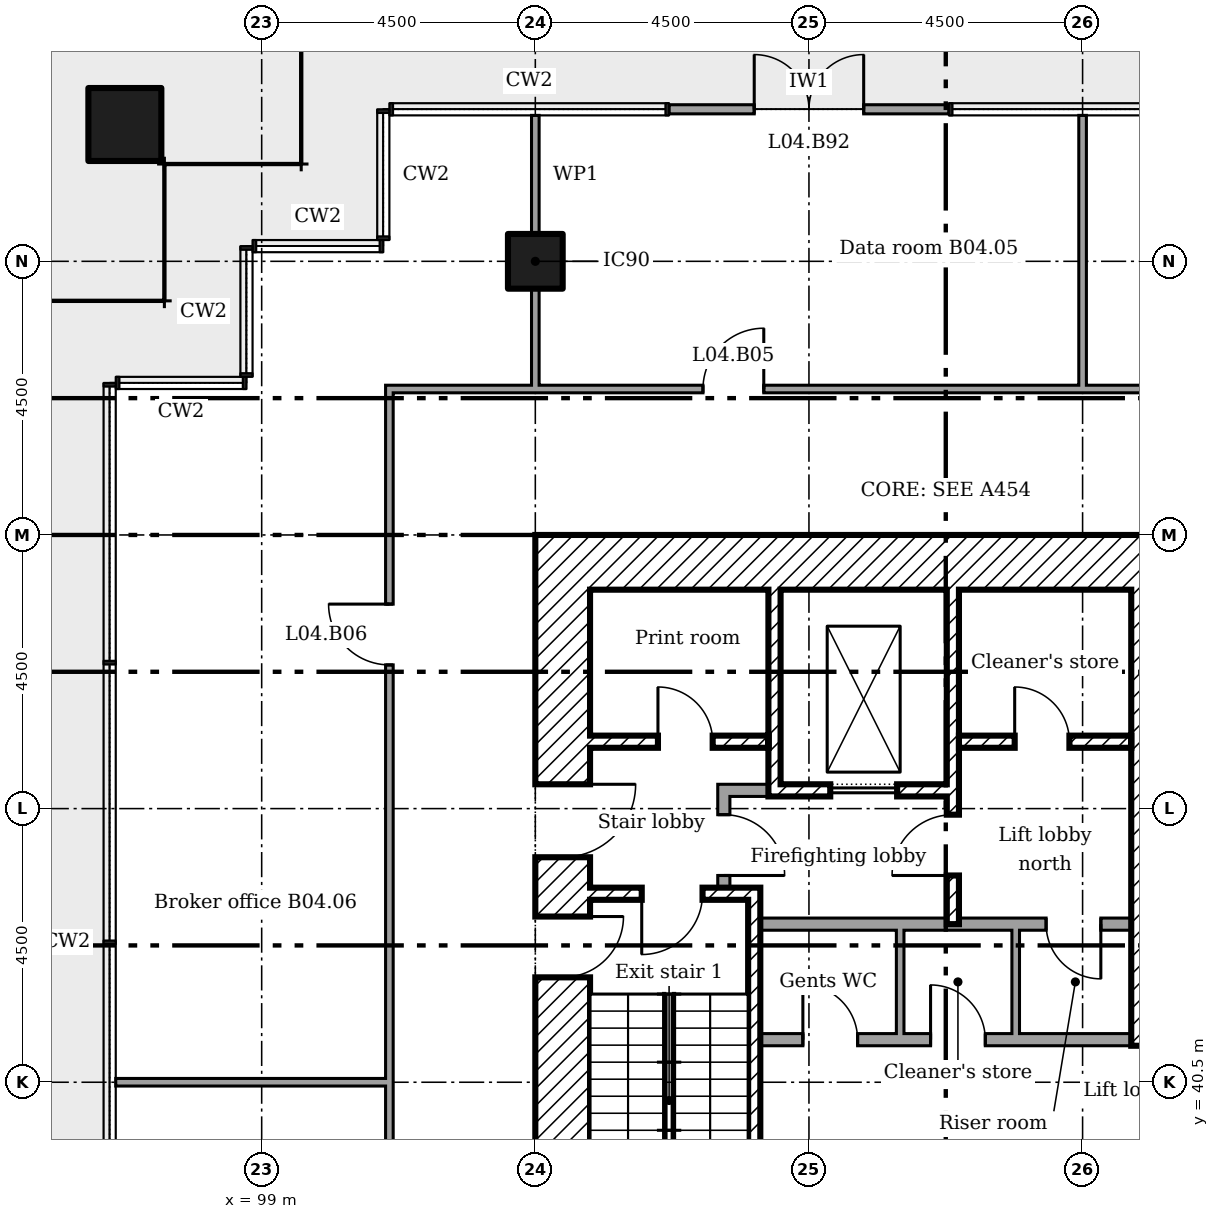
"""IFC4 building model, lengths in metres.
Left out: names, types, materials, properties, quantities, classifications, styles, units other than length and angle.
Written with IfcOpenShell. Run it as: python <this file> out.ifc"""

import sys

from ifc_helpers import new_model, si_unit, direction, frame, frame_2d, origin, origin_2d, place, context, subcontext, project, spatial, rectangle, extrude, element, fill, save


model = new_model("IFC4")
c1 = context("Model", 3, precision=1e-05, world=origin(), true_north=direction((0.0, 1.0)))
c2 = subcontext(c1, "Body", "Model", "MODEL_VIEW")
j1 = project(units=[si_unit("LENGTHUNIT", "METRE"), si_unit("PLANEANGLEUNIT", "RADIAN")], contexts=[c1])
p1 = place(None, origin())
s1 = spatial("IfcSite", under=j1, at=p1, CompositionType="ELEMENT")
p2 = place(p1, origin())
s2 = spatial("IfcBuilding", under=s1, at=p2, CompositionType="ELEMENT")
p3 = place(p2, frame((0.0, 0.0, 21.0)))
s3 = spatial("IfcBuildingStorey", under=s2, at=p3, CompositionType="ELEMENT", Elevation=21.0)
p4 = place(p3, frame((96.75, 56.25, 0.0)))
e1 = element("IfcColumn", 1, at=p4, inside=s3, PredefinedType="COLUMN", context=c2, shape_type="SweptSolid", body=[
    extrude(rectangle(XDim=1.2, YDim=1.2, at=origin_2d()), origin(), (0.0, 0.0, 1.0), 4.4),
])
p5 = place(p3, frame((103.5, 54.0, 0.0)))
e2 = element("IfcColumn", 2, at=p5, inside=s3, PredefinedType="COLUMN", context=c2, shape_type="SweptSolid", body=[
    extrude(rectangle(XDim=0.9, YDim=0.9, at=origin_2d()), origin(), (0.0, 0.0, 1.0), 4.4),
])
p6 = place(p3, frame((110.3, 56.5, 0.0), z_axis=(0.0, 0.0, 1.0), x_axis=(-1.0, 0.0, 0.0)))
e3 = element("IfcWall", 3, at=p6, inside=s3, PredefinedType="SOLIDWALL", context=c2, shape_type="SweptSolid", body=[
    extrude(rectangle(XDim=4.6, YDim=0.15, at=frame_2d((2.3, 0.0))), origin(), (0.0, 0.0, 1.0), 4.225),
])
p7 = place(p6, frame((1.4, 0.0, 0.0)))
e4 = element("IfcOpeningElement", 4, at=p7, cuts=e3, PredefinedType="OPENING", context=c2, shape_type="SweptSolid", body=[
    extrude(rectangle(XDim=1.8, YDim=2.4, at=frame_2d((0.9, 1.2))), frame((0.0, 0.085, 0.0), z_axis=(0.0, -1.0, 0.0), x_axis=(1.0, 0.0, 0.0)), (0.0, 0.0, 1.0), 0.17),
])
p8 = place(p3, frame((104.4, 49.05, 0.0)))
e5 = element("IfcWall", 5, at=p8, inside=s3, PredefinedType="SHEAR", context=c2, shape_type="SweptSolid", body=[
    extrude(rectangle(XDim=11.7, YDim=0.9, at=frame_2d((5.85, 0.0))), origin(), (0.0, 0.0, 1.0), 4.125),
])
p9 = place(p3, frame((103.95, 36.0, 0.0), z_axis=(0.0, 0.0, 1.0), x_axis=(0.0, 1.0, 0.0)))
e6 = element("IfcWall", 6, at=p9, inside=s3, PredefinedType="SHEAR", context=c2, shape_type="SweptSolid", body=[
    extrude(rectangle(XDim=13.5, YDim=0.9, at=frame_2d((6.75, 0.0))), origin(), (0.0, 0.0, 1.0), 4.125),
])
p10 = place(p9, frame((8.2, 0.0, 0.0)))
e7 = element("IfcOpeningElement", 7, at=p10, cuts=e6, PredefinedType="OPENING", context=c2, shape_type="SweptSolid", body=[
    extrude(rectangle(XDim=1.2, YDim=2.1, at=frame_2d((0.6, 1.05))), frame((0.0, 0.46, 0.0), z_axis=(0.0, -1.0, 0.0), x_axis=(1.0, 0.0, 0.0)), (0.0, 0.0, 1.0), 0.92),
])
p11 = place(p9, frame((6.225, 0.0, 0.0)))
e8 = element("IfcOpeningElement", 8, at=p11, cuts=e6, PredefinedType="OPENING", context=c2, shape_type="SweptSolid", body=[
    extrude(rectangle(XDim=1.0, YDim=2.1, at=frame_2d((0.5, 1.05))), frame((0.0, 0.46, 0.0), z_axis=(0.0, -1.0, 0.0), x_axis=(1.0, 0.0, 0.0)), (0.0, 0.0, 1.0), 0.92),
])
p12 = place(p3, frame((107.433, 48.6, 0.0), z_axis=(0.0, 0.0, 1.0), x_axis=(0.0, -1.0, 0.0)))
e9 = element("IfcWall", 9, at=p12, inside=s3, PredefinedType="SHEAR", context=c2, shape_type="SweptSolid", body=[
    extrude(rectangle(XDim=3.4, YDim=0.2, at=frame_2d((1.7, 0.0))), origin(), (0.0, 0.0, 1.0), 4.125),
])
p13 = place(p3, frame((110.367, 48.6, 0.0), z_axis=(0.0, 0.0, 1.0), x_axis=(0.0, -1.0, 0.0)))
e10 = element("IfcWall", 10, at=p13, inside=s3, PredefinedType="SHEAR", context=c2, shape_type="SweptSolid", body=[
    extrude(rectangle(XDim=5.5, YDim=0.2, at=frame_2d((2.75, 0.0))), origin(), (0.0, 0.0, 1.0), 4.125),
])
p14 = place(p13, frame((3.7, 0.0, 0.0)))
e11 = element("IfcOpeningElement", 11, at=p14, cuts=e10, PredefinedType="OPENING", context=c2, shape_type="SweptSolid", body=[
    extrude(rectangle(XDim=1.0, YDim=2.1, at=frame_2d((0.5, 1.05))), frame((0.0, 0.11, 0.0), z_axis=(0.0, -1.0, 0.0), x_axis=(1.0, 0.0, 0.0)), (0.0, 0.0, 1.0), 0.22),
])
p15 = place(p3, frame((106.5, 45.3, 0.0)))
e12 = element("IfcWall", 12, at=p15, inside=s3, PredefinedType="PARTITIONING", context=c2, shape_type="SweptSolid", body=[
    extrude(rectangle(XDim=0.833, YDim=0.2, at=frame_2d((0.417, 0.0))), origin(), (0.0, 0.0, 1.0), 4.125),
])
p16 = place(p3, frame((106.6, 43.7, 0.0), z_axis=(0.0, 0.0, 1.0), x_axis=(0.0, 1.0, 0.0)))
e13 = element("IfcWall", 13, at=p16, inside=s3, PredefinedType="PARTITIONING", context=c2, shape_type="SweptSolid", body=[
    extrude(rectangle(XDim=1.5, YDim=0.2, at=frame_2d((0.75, 0.0))), origin(), (0.0, 0.0, 1.0), 4.125),
])
p17 = place(p16, frame((0.2, 0.0, 0.0)))
e14 = element("IfcOpeningElement", 14, at=p17, cuts=e13, PredefinedType="OPENING", context=c2, shape_type="SweptSolid", body=[
    extrude(rectangle(XDim=1.0, YDim=2.1, at=frame_2d((0.5, 1.05))), frame((0.0, 0.11, 0.0), z_axis=(0.0, -1.0, 0.0), x_axis=(1.0, 0.0, 0.0)), (0.0, 0.0, 1.0), 0.22),
])
p18 = place(p3, frame((104.4, 46.1, 0.0)))
e15 = element("IfcWall", 15, at=p18, inside=s3, PredefinedType="SHEAR", context=c2, shape_type="SweptSolid", body=[
    extrude(rectangle(XDim=2.933, YDim=0.2, at=frame_2d((1.467, 0.0))), origin(), (0.0, 0.0, 1.0), 4.125),
])
p19 = place(p18, frame((1.117, 0.0, 0.0)))
e16 = element("IfcOpeningElement", 16, at=p19, cuts=e15, PredefinedType="OPENING", context=c2, shape_type="SweptSolid", body=[
    extrude(rectangle(XDim=0.9, YDim=2.1, at=frame_2d((0.45, 1.05))), frame((0.0, 0.11, 0.0), z_axis=(0.0, -1.0, 0.0), x_axis=(1.0, 0.0, 0.0)), (0.0, 0.0, 1.0), 0.22),
])
p20 = place(p3, frame((110.467, 46.1, 0.0)))
e17 = element("IfcWall", 17, at=p20, inside=s3, PredefinedType="SHEAR", context=c2, shape_type="SweptSolid", body=[
    extrude(rectangle(XDim=2.833, YDim=0.2, at=frame_2d((1.417, 0.0))), origin(), (0.0, 0.0, 1.0), 4.125),
])
p21 = place(p20, frame((0.917, 0.0, 0.0)))
e18 = element("IfcOpeningElement", 18, at=p21, cuts=e17, PredefinedType="OPENING", context=c2, shape_type="SweptSolid", body=[
    extrude(rectangle(XDim=0.9, YDim=2.1, at=frame_2d((0.45, 1.05))), frame((0.0, 0.11, 0.0), z_axis=(0.0, -1.0, 0.0), x_axis=(1.0, 0.0, 0.0)), (0.0, 0.0, 1.0), 0.22),
])
p22 = place(p3, frame((107.533, 45.3, 0.0)))
e19 = element("IfcWall", 19, at=p22, inside=s3, PredefinedType="SHEAR", context=c2, shape_type="SweptSolid", body=[
    extrude(rectangle(XDim=2.733, YDim=0.2, at=frame_2d((1.367, 0.0))), origin(), (0.0, 0.0, 1.0), 4.125),
])
p23 = place(p22, frame((0.817, 0.0, 0.0)))
e20 = element("IfcOpeningElement", 20, at=p23, cuts=e19, PredefinedType="OPENING", context=c2, shape_type="SweptSolid", body=[
    extrude(rectangle(XDim=1.1, YDim=2.1, at=frame_2d((0.55, 1.05))), frame((0.0, 0.11, 0.0), z_axis=(0.0, -1.0, 0.0), x_axis=(1.0, 0.0, 0.0)), (0.0, 0.0, 1.0), 0.22),
])
p24 = place(p3, frame((107.1, 36.9, 0.0), z_axis=(0.0, 0.0, 1.0), x_axis=(0.0, 1.0, 0.0)))
e21 = element("IfcWall", 21, at=p24, inside=s3, PredefinedType="SHEAR", context=c2, shape_type="SweptSolid", body=[
    extrude(rectangle(XDim=6.8, YDim=0.2, at=frame_2d((3.4, 0.0))), origin(), (0.0, 0.0, 1.0), 4.125),
])
p25 = place(p3, frame((104.4, 43.6, 0.0)))
e22 = element("IfcWall", 22, at=p25, inside=s3, PredefinedType="SHEAR", context=c2, shape_type="SweptSolid", body=[
    extrude(rectangle(XDim=2.6, YDim=0.2, at=frame_2d((1.3, 0.0))), origin(), (0.0, 0.0, 1.0), 4.125),
])
p26 = place(p25, frame((0.85, 0.0, 0.0)))
e23 = element("IfcOpeningElement", 23, at=p26, cuts=e22, PredefinedType="OPENING", context=c2, shape_type="SweptSolid", body=[
    extrude(rectangle(XDim=1.0, YDim=2.1, at=frame_2d((0.5, 1.05))), frame((0.0, 0.11, 0.0), z_axis=(0.0, -1.0, 0.0), x_axis=(1.0, 0.0, 0.0)), (0.0, 0.0, 1.0), 0.22),
])
p27 = place(p3, frame((113.4, 41.1, 0.0), z_axis=(0.0, 0.0, 1.0), x_axis=(0.0, 1.0, 0.0)))
e24 = element("IfcWall", 24, at=p27, inside=s3, PredefinedType="SHEAR", context=c2, shape_type="SweptSolid", body=[
    extrude(rectangle(XDim=7.5, YDim=0.2, at=frame_2d((3.75, 0.0))), origin(), (0.0, 0.0, 1.0), 4.125),
])
p28 = place(p3, frame((107.2, 43.1, 0.0)))
e25 = element("IfcWall", 25, at=p28, inside=s3, PredefinedType="PARTITIONING", context=c2, shape_type="SweptSolid", body=[
    extrude(rectangle(XDim=6.1, YDim=0.2, at=frame_2d((3.05, 0.0))), origin(), (0.0, 0.0, 1.0), 4.125),
])
p29 = place(p28, frame((4.7, 0.0, 0.0)))
e26 = element("IfcOpeningElement", 26, at=p29, cuts=e25, PredefinedType="OPENING", context=c2, shape_type="SweptSolid", body=[
    extrude(rectangle(XDim=0.9, YDim=2.1, at=frame_2d((0.45, 1.05))), frame((0.0, 0.11, 0.0), z_axis=(0.0, -1.0, 0.0), x_axis=(1.0, 0.0, 0.0)), (0.0, 0.0, 1.0), 0.22),
])
p30 = place(p3, frame((107.2, 41.2, 0.0)))
e27 = element("IfcWall", 27, at=p30, inside=s3, PredefinedType="PARTITIONING", context=c2, shape_type="SweptSolid", body=[
    extrude(rectangle(XDim=6.1, YDim=0.2, at=frame_2d((3.05, 0.0))), origin(), (0.0, 0.0, 1.0), 4.125),
])
p31 = place(p30, frame((0.7, 0.0, 0.0)))
e28 = element("IfcOpeningElement", 28, at=p31, cuts=e27, PredefinedType="OPENING", context=c2, shape_type="SweptSolid", body=[
    extrude(rectangle(XDim=0.9, YDim=2.1, at=frame_2d((0.45, 1.05))), frame((0.0, 0.11, 0.0), z_axis=(0.0, -1.0, 0.0), x_axis=(1.0, 0.0, 0.0)), (0.0, 0.0, 1.0), 0.22),
])
p32 = place(p30, frame((2.8, 0.0, 0.0)))
e29 = element("IfcOpeningElement", 29, at=p32, cuts=e27, PredefinedType="OPENING", context=c2, shape_type="SweptSolid", body=[
    extrude(rectangle(XDim=0.9, YDim=2.1, at=frame_2d((0.45, 1.05))), frame((0.0, 0.11, 0.0), z_axis=(0.0, -1.0, 0.0), x_axis=(1.0, 0.0, 0.0)), (0.0, 0.0, 1.0), 0.22),
])
for number, where, z_axis, x_axis in (
    (30, (109.5, 41.3, 0.0), (0.0, 0.0, 1.0), (0.0, 1.0, 0.0)),
    (31, (111.4, 41.3, 0.0), (0.0, 0.0, 1.0), (0.0, 1.0, 0.0)),
):
    element("IfcWall", number, at=place(p3, frame(where, z_axis=z_axis, x_axis=x_axis)), inside=s3, PredefinedType="PARTITIONING", context=c2, shape_type="SweptSolid", body=[
        extrude(rectangle(XDim=1.7, YDim=0.125, at=frame_2d((0.85, 0.0))), origin(), (0.0, 0.0, 1.0), 4.125),
    ])
p33 = place(p3, frame((96.6, 40.5, 0.0)))
e32 = element("IfcWall", 32, at=p33, inside=s3, PredefinedType="PARTITIONING", context=c2, shape_type="SweptSolid", body=[
    extrude(rectangle(XDim=4.5, YDim=0.125, at=frame_2d((2.25, 0.0))), origin(), (0.0, 0.0, 1.0), 3.613),
])
p34 = place(p3, frame((101.038, 51.9, 0.0)))
e33 = element("IfcWall", 33, at=p34, inside=s3, PredefinedType="PARTITIONING", context=c2, shape_type="SweptSolid", body=[
    extrude(rectangle(XDim=19.025, YDim=0.125, at=frame_2d((9.512, 0.0))), origin(), (0.0, 0.0, 1.0), 4.225),
])
p35 = place(p34, frame((14.413, 0.0, 0.0)))
e34 = element("IfcOpeningElement", 34, at=p35, cuts=e33, PredefinedType="OPENING", context=c2, shape_type="SweptSolid", body=[
    extrude(rectangle(XDim=1.0, YDim=2.1, at=frame_2d((0.5, 1.05))), frame((0.0, 0.073, 0.0), z_axis=(0.0, -1.0, 0.0), x_axis=(1.0, 0.0, 0.0)), (0.0, 0.0, 1.0), 0.145),
])
p36 = place(p34, frame((5.219, 0.0, 0.0)))
e35 = element("IfcOpeningElement", 35, at=p36, cuts=e33, PredefinedType="OPENING", context=c2, shape_type="SweptSolid", body=[
    extrude(rectangle(XDim=1.0, YDim=2.1, at=frame_2d((0.5, 1.05))), frame((0.0, 0.073, 0.0), z_axis=(0.0, -1.0, 0.0), x_axis=(1.0, 0.0, 0.0)), (0.0, 0.0, 1.0), 0.145),
])
p37 = place(p3, frame((101.1, 34.262, 0.0), z_axis=(0.0, 0.0, 1.0), x_axis=(0.0, 1.0, 0.0)))
e36 = element("IfcWall", 36, at=p37, inside=s3, PredefinedType="PARTITIONING", context=c2, shape_type="SweptSolid", body=[
    extrude(rectangle(XDim=17.575, YDim=0.125, at=frame_2d((8.788, 0.0))), origin(), (0.0, 0.0, 1.0), 4.225),
])
p38 = place(p37, frame((2.587, 0.0, 0.0)))
e37 = element("IfcOpeningElement", 37, at=p38, cuts=e36, PredefinedType="OPENING", context=c2, shape_type="SweptSolid", body=[
    extrude(rectangle(XDim=1.0, YDim=2.1, at=frame_2d((0.5, 1.05))), frame((0.0, 0.073, 0.0), z_axis=(0.0, -1.0, 0.0), x_axis=(1.0, 0.0, 0.0)), (0.0, 0.0, 1.0), 0.145),
])
p39 = place(p37, frame((13.101, 0.0, 0.0)))
e38 = element("IfcOpeningElement", 38, at=p39, cuts=e36, PredefinedType="OPENING", context=c2, shape_type="SweptSolid", body=[
    extrude(rectangle(XDim=1.0, YDim=2.1, at=frame_2d((0.5, 1.05))), frame((0.0, 0.073, 0.0), z_axis=(0.0, -1.0, 0.0), x_axis=(1.0, 0.0, 0.0)), (0.0, 0.0, 1.0), 0.145),
])
p40 = place(p3, frame((103.5, 51.9, 0.0), z_axis=(0.0, 0.0, 1.0), x_axis=(0.0, 1.0, 0.0)))
e39 = element("IfcWall", 39, at=p40, inside=s3, PredefinedType="PARTITIONING", context=c2, shape_type="SweptSolid", body=[
    extrude(rectangle(XDim=1.65, YDim=0.125, at=frame_2d((0.825, 0.0))), origin(), (0.0, 0.0, 1.0), 3.602),
])
p41 = place(p3, frame((103.5, 54.45, 0.0), z_axis=(0.0, 0.0, 1.0), x_axis=(0.0, 1.0, 0.0)))
e40 = element("IfcWall", 40, at=p41, inside=s3, PredefinedType="PARTITIONING", context=c2, shape_type="SweptSolid", body=[
    extrude(rectangle(XDim=1.95, YDim=0.125, at=frame_2d((0.975, 0.0))), origin(), (0.0, 0.0, 1.0), 3.602),
])
p42 = place(p3, frame((112.5, 51.9, 0.0), z_axis=(0.0, 0.0, 1.0), x_axis=(0.0, 1.0, 0.0)))
e41 = element("IfcWall", 41, at=p42, inside=s3, PredefinedType="PARTITIONING", context=c2, shape_type="SweptSolid", body=[
    extrude(rectangle(XDim=4.5, YDim=0.125, at=frame_2d((2.25, 0.0))), origin(), (0.0, 0.0, 1.0), 3.613),
])
p43 = place(p7, frame((1.8, 0.0, 0.0), x_axis=(-1.0, 0.0, 0.0)))
e42 = element("IfcDoor", 42, at=p43, inside=s3, OperationType="DOUBLE_DOOR_DOUBLE_SWING", PredefinedType="NOTDEFINED", context=c2, shape_type="SweptSolid", body=[
    extrude(rectangle(XDim=1.8, YDim=2.4, at=frame_2d((0.9, 1.2))), frame((0.0, 0.025, 0.0), z_axis=(0.0, -1.0, 0.0), x_axis=(1.0, 0.0, 0.0)), (0.0, 0.0, 1.0), 0.05),
])
fill(e4, e42)
p44 = place(p10, frame((1.2, 0.0, 0.0), x_axis=(-1.0, 0.0, 0.0)))
e43 = element("IfcDoor", 43, at=p44, inside=s3, OperationType="SINGLE_SWING_RIGHT", PredefinedType="DOOR", context=c2, shape_type="SweptSolid", body=[
    extrude(rectangle(XDim=1.2, YDim=2.1, at=frame_2d((0.6, 1.05))), frame((0.0, 0.025, 0.0), z_axis=(0.0, -1.0, 0.0), x_axis=(1.0, 0.0, 0.0)), (0.0, 0.0, 1.0), 0.05),
])
fill(e7, e43)
p45 = place(p26, frame((1.0, 0.0, 0.0), x_axis=(-1.0, 0.0, 0.0)))
e44 = element("IfcDoor", 44, at=p45, inside=s3, OperationType="SINGLE_SWING_LEFT", PredefinedType="DOOR", context=c2, shape_type="SweptSolid", body=[
    extrude(rectangle(XDim=1.0, YDim=2.1, at=frame_2d((0.5, 1.05))), frame((0.0, 0.025, 0.0), z_axis=(0.0, -1.0, 0.0), x_axis=(1.0, 0.0, 0.0)), (0.0, 0.0, 1.0), 0.05),
])
fill(e23, e44)
p46 = place(p11, frame((1.0, 0.0, 0.0), x_axis=(-1.0, 0.0, 0.0)))
e45 = element("IfcDoor", 45, at=p46, inside=s3, OperationType="SINGLE_SWING_RIGHT", PredefinedType="DOOR", context=c2, shape_type="SweptSolid", body=[
    extrude(rectangle(XDim=1.0, YDim=2.1, at=frame_2d((0.5, 1.05))), frame((0.0, 0.025, 0.0), z_axis=(0.0, -1.0, 0.0), x_axis=(1.0, 0.0, 0.0)), (0.0, 0.0, 1.0), 0.05),
])
fill(e8, e45)
p47 = place(p14, frame((1.0, 0.0, 0.0), x_axis=(-1.0, 0.0, 0.0)))
e46 = element("IfcDoor", 46, at=p47, inside=s3, OperationType="SINGLE_SWING_RIGHT", PredefinedType="DOOR", context=c2, shape_type="SweptSolid", body=[
    extrude(rectangle(XDim=1.0, YDim=2.1, at=frame_2d((0.5, 1.05))), frame((0.0, 0.025, 0.0), z_axis=(0.0, -1.0, 0.0), x_axis=(1.0, 0.0, 0.0)), (0.0, 0.0, 1.0), 0.05),
])
fill(e11, e46)
p48 = place(p17, frame((1.0, 0.0, 0.0), x_axis=(-1.0, 0.0, 0.0)))
e47 = element("IfcDoor", 47, at=p48, inside=s3, OperationType="SINGLE_SWING_LEFT", PredefinedType="DOOR", context=c2, shape_type="SweptSolid", body=[
    extrude(rectangle(XDim=1.0, YDim=2.1, at=frame_2d((0.5, 1.05))), frame((0.0, 0.025, 0.0), z_axis=(0.0, -1.0, 0.0), x_axis=(1.0, 0.0, 0.0)), (0.0, 0.0, 1.0), 0.05),
])
fill(e14, e47)
p49 = place(p19, origin())
e48 = element("IfcDoor", 48, at=p49, inside=s3, OperationType="SINGLE_SWING_RIGHT", PredefinedType="DOOR", context=c2, shape_type="SweptSolid", body=[
    extrude(rectangle(XDim=0.9, YDim=2.1, at=frame_2d((0.45, 1.05))), frame((0.0, 0.025, 0.0), z_axis=(0.0, -1.0, 0.0), x_axis=(1.0, 0.0, 0.0)), (0.0, 0.0, 1.0), 0.05),
])
fill(e16, e48)
p50 = place(p21, origin())
e49 = element("IfcDoor", 49, at=p50, inside=s3, OperationType="SINGLE_SWING_RIGHT", PredefinedType="DOOR", context=c2, shape_type="SweptSolid", body=[
    extrude(rectangle(XDim=0.9, YDim=2.1, at=frame_2d((0.45, 1.05))), frame((0.0, 0.025, 0.0), z_axis=(0.0, -1.0, 0.0), x_axis=(1.0, 0.0, 0.0)), (0.0, 0.0, 1.0), 0.05),
])
fill(e18, e49)
p51 = place(p31, origin())
e50 = element("IfcDoor", 50, at=p51, inside=s3, OperationType="SINGLE_SWING_RIGHT", PredefinedType="DOOR", context=c2, shape_type="SweptSolid", body=[
    extrude(rectangle(XDim=0.9, YDim=2.1, at=frame_2d((0.45, 1.05))), frame((0.0, 0.025, 0.0), z_axis=(0.0, -1.0, 0.0), x_axis=(1.0, 0.0, 0.0)), (0.0, 0.0, 1.0), 0.05),
])
fill(e28, e50)
p52 = place(p32, origin())
e51 = element("IfcDoor", 51, at=p52, inside=s3, OperationType="SINGLE_SWING_RIGHT", PredefinedType="DOOR", context=c2, shape_type="SweptSolid", body=[
    extrude(rectangle(XDim=0.9, YDim=2.1, at=frame_2d((0.45, 1.05))), frame((0.0, 0.025, 0.0), z_axis=(0.0, -1.0, 0.0), x_axis=(1.0, 0.0, 0.0)), (0.0, 0.0, 1.0), 0.05),
])
fill(e29, e51)
p53 = place(p29, frame((0.9, 0.0, 0.0), x_axis=(-1.0, 0.0, 0.0)))
e52 = element("IfcDoor", 52, at=p53, inside=s3, OperationType="SINGLE_SWING_RIGHT", PredefinedType="DOOR", context=c2, shape_type="SweptSolid", body=[
    extrude(rectangle(XDim=0.9, YDim=2.1, at=frame_2d((0.45, 1.05))), frame((0.0, 0.025, 0.0), z_axis=(0.0, -1.0, 0.0), x_axis=(1.0, 0.0, 0.0)), (0.0, 0.0, 1.0), 0.05),
])
fill(e26, e52)
p54 = place(p23, origin())
e53 = element("IfcDoor", 53, at=p54, inside=s3, OperationType="SLIDING_TO_LEFT", PredefinedType="DOOR", context=c2, shape_type="SweptSolid", body=[
    extrude(rectangle(XDim=1.1, YDim=2.1, at=frame_2d((0.55, 1.05))), frame((0.0, 0.025, 0.0), z_axis=(0.0, -1.0, 0.0), x_axis=(1.0, 0.0, 0.0)), (0.0, 0.0, 1.0), 0.05),
])
fill(e20, e53)
p55 = place(p36, origin())
e54 = element("IfcDoor", 54, at=p55, inside=s3, OperationType="SINGLE_SWING_LEFT", PredefinedType="DOOR", context=c2, shape_type="SweptSolid", body=[
    extrude(rectangle(XDim=1.0, YDim=2.1, at=frame_2d((0.5, 1.05))), frame((0.0, 0.025, 0.0), z_axis=(0.0, -1.0, 0.0), x_axis=(1.0, 0.0, 0.0)), (0.0, 0.0, 1.0), 0.05),
])
fill(e35, e54)
p56 = place(p39, origin())
e55 = element("IfcDoor", 55, at=p56, inside=s3, OperationType="SINGLE_SWING_LEFT", PredefinedType="DOOR", context=c2, shape_type="SweptSolid", body=[
    extrude(rectangle(XDim=1.0, YDim=2.1, at=frame_2d((0.5, 1.05))), frame((0.0, 0.025, 0.0), z_axis=(0.0, -1.0, 0.0), x_axis=(1.0, 0.0, 0.0)), (0.0, 0.0, 1.0), 0.05),
])
fill(e38, e55)
save(model, sys.argv[1])
